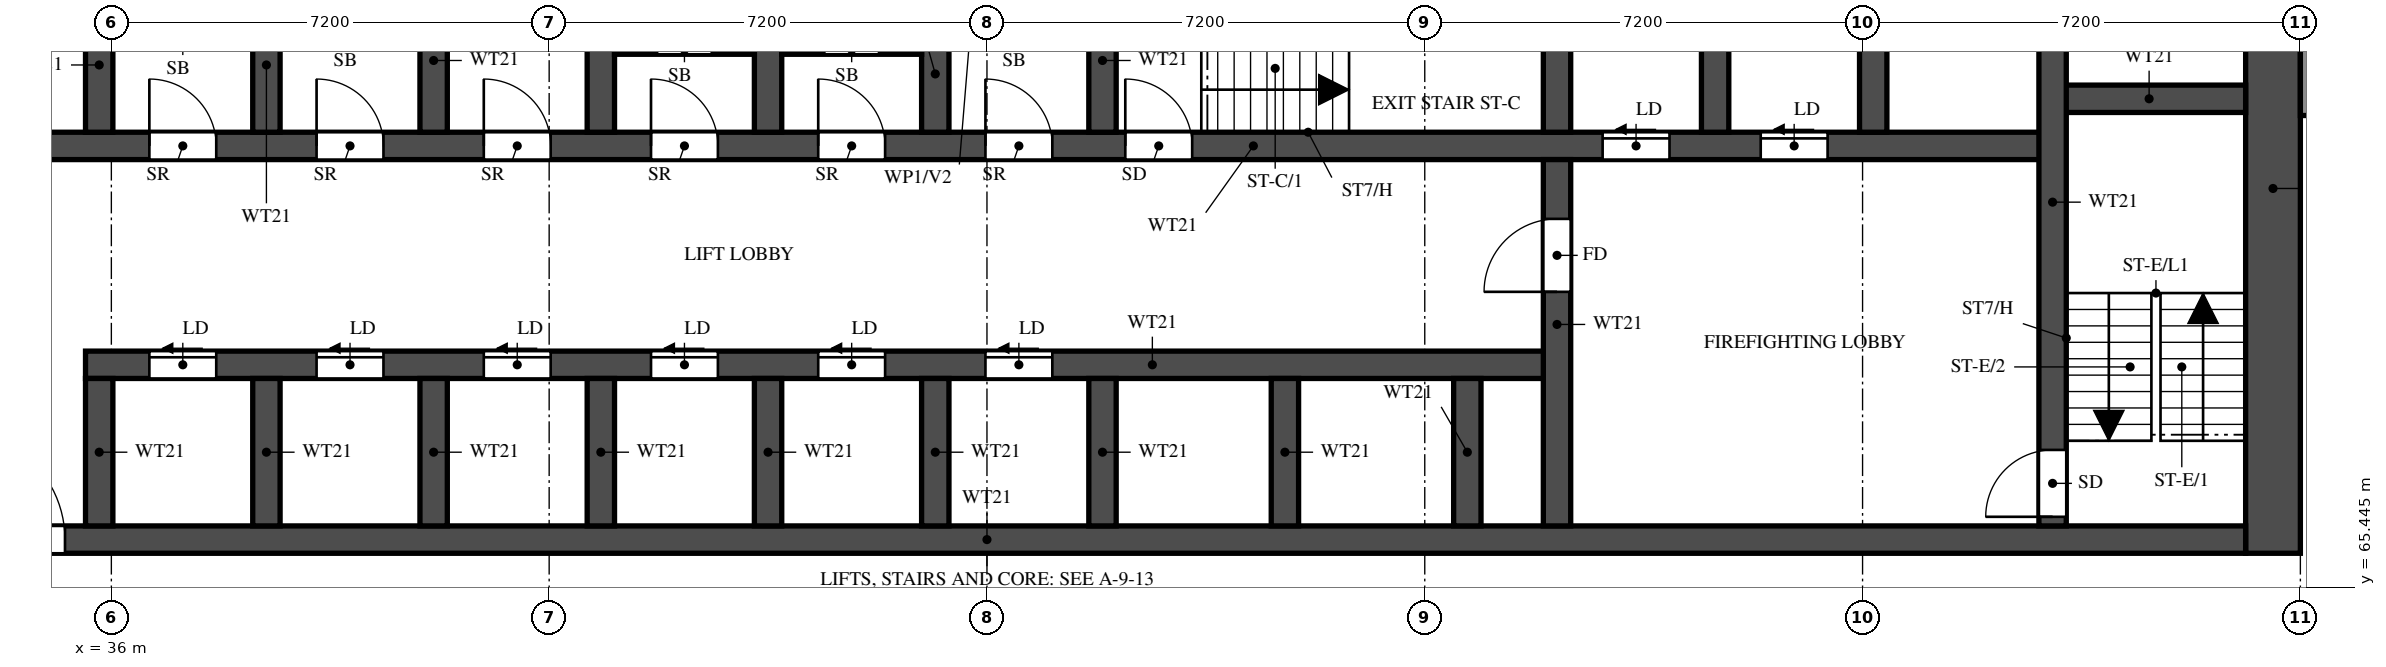
"""IFC4 building model, lengths in metres.
Left out: names, types, materials, properties, quantities, classifications, styles, units other than length and angle.
Written with IfcOpenShell. Run it as: python <this file> out.ifc"""

import sys

from ifc_helpers import new_model, si_unit, direction, frame, frame_2d, origin, place, context, subcontext, project, spatial, rectangle, extrude, element, fill, save


model = new_model("IFC4")
c1 = context("Model", 3, precision=1e-05, world=origin(), true_north=direction((0.0, 1.0)))
c2 = subcontext(c1, "Body", "Model", "MODEL_VIEW")
j1 = project(units=[si_unit("LENGTHUNIT", "METRE"), si_unit("PLANEANGLEUNIT", "RADIAN")], contexts=[c1])
p1 = place(None, origin())
s1 = spatial("IfcSite", under=j1, at=p1, CompositionType="ELEMENT")
p2 = place(p1, origin())
s2 = spatial("IfcBuilding", under=s1, at=p2, CompositionType="ELEMENT")
p3 = place(p2, frame((0.0, 0.0, 86.5)))
s3 = spatial("IfcBuildingStorey", under=s2, at=p3, CompositionType="ELEMENT", Elevation=86.5)
p4 = place(p3, frame((71.55, 66.0, 0.0), z_axis=(0.0, 0.0, 1.0), x_axis=(0.0, 1.0, 0.0)))
e1 = element("IfcWall", 1, at=p4, inside=s3, PredefinedType="SHEAR", context=c2, shape_type="SweptSolid", body=[
    extrude(rectangle(XDim=12.0, YDim=0.9, at=frame_2d((6.0, 0.0))), origin(), (0.0, 0.0, 1.0), 3.18),
])
p5 = place(p3, frame((29.7, 66.225, 0.0), z_axis=(0.0, 0.0, 1.0), x_axis=(1.0, 0.0, 0.0)))
e2 = element("IfcWall", 2, at=p5, inside=s3, PredefinedType="SHEAR", context=c2, shape_type="SweptSolid", body=[
    extrude(rectangle(XDim=41.4, YDim=0.45, at=frame_2d((20.7, 0.0))), origin(), (0.0, 0.0, 1.0), 3.18),
])
p6 = place(p5, frame((0.925, 0.0, 0.0)))
e3 = element("IfcOpeningElement", 3, at=p6, cuts=e2, PredefinedType="OPENING", context=c2, shape_type="SweptSolid", body=[
    extrude(rectangle(XDim=1.1, YDim=2.1, at=frame_2d((0.55, 1.05))), frame((0.0, 0.235, 0.0), z_axis=(0.0, -1.0, 0.0), x_axis=(1.0, 0.0, 0.0)), (0.0, 0.0, 1.0), 0.47),
])
p7 = place(p5, frame((3.738, 0.0, 0.0)))
e4 = element("IfcOpeningElement", 4, at=p7, cuts=e2, PredefinedType="OPENING", context=c2, shape_type="SweptSolid", body=[
    extrude(rectangle(XDim=1.8, YDim=2.1, at=frame_2d((0.9, 1.05))), frame((0.0, 0.235, 0.0), z_axis=(0.0, -1.0, 0.0), x_axis=(1.0, 0.0, 0.0)), (0.0, 0.0, 1.0), 0.47),
])
p8 = place(p3, frame((35.575, 69.1, 0.0), z_axis=(0.0, 0.0, 1.0), x_axis=(1.0, 0.0, 0.0)))
e5 = element("IfcWall", 5, at=p8, inside=s3, PredefinedType="SHEAR", context=c2, shape_type="SweptSolid", body=[
    extrude(rectangle(XDim=24.2, YDim=0.45, at=frame_2d((12.1, 0.0))), origin(), (0.0, 0.0, 1.0), 3.18),
])
p9 = place(p8, frame((1.05, 0.0, 0.0)))
e6 = element("IfcOpeningElement", 6, at=p9, cuts=e5, PredefinedType="OPENING", context=c2, shape_type="SweptSolid", body=[
    extrude(rectangle(XDim=1.1, YDim=2.1, at=frame_2d((0.55, 1.05))), frame((0.0, 0.235, 0.0), z_axis=(0.0, -1.0, 0.0), x_axis=(1.0, 0.0, 0.0)), (0.0, 0.0, 1.0), 0.47),
])
p10 = place(p8, frame((3.8, 0.0, 0.0)))
e7 = element("IfcOpeningElement", 7, at=p10, cuts=e5, PredefinedType="OPENING", context=c2, shape_type="SweptSolid", body=[
    extrude(rectangle(XDim=1.1, YDim=2.1, at=frame_2d((0.55, 1.05))), frame((0.0, 0.235, 0.0), z_axis=(0.0, -1.0, 0.0), x_axis=(1.0, 0.0, 0.0)), (0.0, 0.0, 1.0), 0.47),
])
p11 = place(p8, frame((6.55, 0.0, 0.0)))
e8 = element("IfcOpeningElement", 8, at=p11, cuts=e5, PredefinedType="OPENING", context=c2, shape_type="SweptSolid", body=[
    extrude(rectangle(XDim=1.1, YDim=2.1, at=frame_2d((0.55, 1.05))), frame((0.0, 0.235, 0.0), z_axis=(0.0, -1.0, 0.0), x_axis=(1.0, 0.0, 0.0)), (0.0, 0.0, 1.0), 0.47),
])
p12 = place(p8, frame((9.3, 0.0, 0.0)))
e9 = element("IfcOpeningElement", 9, at=p12, cuts=e5, PredefinedType="OPENING", context=c2, shape_type="SweptSolid", body=[
    extrude(rectangle(XDim=1.1, YDim=2.1, at=frame_2d((0.55, 1.05))), frame((0.0, 0.235, 0.0), z_axis=(0.0, -1.0, 0.0), x_axis=(1.0, 0.0, 0.0)), (0.0, 0.0, 1.0), 0.47),
])
p13 = place(p8, frame((12.05, 0.0, 0.0)))
e10 = element("IfcOpeningElement", 10, at=p13, cuts=e5, PredefinedType="OPENING", context=c2, shape_type="SweptSolid", body=[
    extrude(rectangle(XDim=1.1, YDim=2.1, at=frame_2d((0.55, 1.05))), frame((0.0, 0.235, 0.0), z_axis=(0.0, -1.0, 0.0), x_axis=(1.0, 0.0, 0.0)), (0.0, 0.0, 1.0), 0.47),
])
p14 = place(p8, frame((14.8, 0.0, 0.0)))
e11 = element("IfcOpeningElement", 11, at=p14, cuts=e5, PredefinedType="OPENING", context=c2, shape_type="SweptSolid", body=[
    extrude(rectangle(XDim=1.1, YDim=2.1, at=frame_2d((0.55, 1.05))), frame((0.0, 0.235, 0.0), z_axis=(0.0, -1.0, 0.0), x_axis=(1.0, 0.0, 0.0)), (0.0, 0.0, 1.0), 0.47),
])
p15 = place(p3, frame((32.875, 72.7, 0.0), z_axis=(0.0, 0.0, 1.0), x_axis=(1.0, 0.0, 0.0)))
e12 = element("IfcWall", 12, at=p15, inside=s3, PredefinedType="SHEAR", context=c2, shape_type="SweptSolid", body=[
    extrude(rectangle(XDim=35.05, YDim=0.45, at=frame_2d((17.525, 0.0))), origin(), (0.0, 0.0, 1.0), 3.18),
])
p16 = place(p15, frame((19.8, 0.0, 0.0)))
e13 = element("IfcOpeningElement", 13, at=p16, cuts=e12, PredefinedType="OPENING", context=c2, shape_type="SweptSolid", body=[
    extrude(rectangle(XDim=1.1, YDim=2.1, at=frame_2d((0.55, 1.05))), frame((0.0, 0.235, 0.0), z_axis=(0.0, -1.0, 0.0), x_axis=(1.0, 0.0, 0.0)), (0.0, 0.0, 1.0), 0.47),
])
p17 = place(p15, frame((27.65, 0.0, 0.0)))
e14 = element("IfcOpeningElement", 14, at=p17, cuts=e12, PredefinedType="OPENING", context=c2, shape_type="SweptSolid", body=[
    extrude(rectangle(XDim=1.1, YDim=2.1, at=frame_2d((0.55, 1.05))), frame((0.0, 0.235, 0.0), z_axis=(0.0, -1.0, 0.0), x_axis=(1.0, 0.0, 0.0)), (0.0, 0.0, 1.0), 0.47),
])
p18 = place(p15, frame((30.25, 0.0, 0.0)))
e15 = element("IfcOpeningElement", 15, at=p18, cuts=e12, PredefinedType="OPENING", context=c2, shape_type="SweptSolid", body=[
    extrude(rectangle(XDim=1.1, YDim=2.1, at=frame_2d((0.55, 1.05))), frame((0.0, 0.235, 0.0), z_axis=(0.0, -1.0, 0.0), x_axis=(1.0, 0.0, 0.0)), (0.0, 0.0, 1.0), 0.47),
])
p19 = place(p15, frame((3.75, 0.0, 0.0)))
e16 = element("IfcOpeningElement", 16, at=p19, cuts=e12, PredefinedType="OPENING", context=c2, shape_type="SweptSolid", body=[
    extrude(rectangle(XDim=1.1, YDim=2.1, at=frame_2d((0.55, 1.05))), frame((0.0, 0.235, 0.0), z_axis=(0.0, -1.0, 0.0), x_axis=(1.0, 0.0, 0.0)), (0.0, 0.0, 1.0), 0.47),
])
p20 = place(p15, frame((6.5, 0.0, 0.0)))
e17 = element("IfcOpeningElement", 17, at=p20, cuts=e12, PredefinedType="OPENING", context=c2, shape_type="SweptSolid", body=[
    extrude(rectangle(XDim=1.1, YDim=2.1, at=frame_2d((0.55, 1.05))), frame((0.0, 0.235, 0.0), z_axis=(0.0, -1.0, 0.0), x_axis=(1.0, 0.0, 0.0)), (0.0, 0.0, 1.0), 0.47),
])
p21 = place(p15, frame((9.25, 0.0, 0.0)))
e18 = element("IfcOpeningElement", 18, at=p21, cuts=e12, PredefinedType="OPENING", context=c2, shape_type="SweptSolid", body=[
    extrude(rectangle(XDim=1.1, YDim=2.1, at=frame_2d((0.55, 1.05))), frame((0.0, 0.235, 0.0), z_axis=(0.0, -1.0, 0.0), x_axis=(1.0, 0.0, 0.0)), (0.0, 0.0, 1.0), 0.47),
])
p22 = place(p15, frame((12.0, 0.0, 0.0)))
e19 = element("IfcOpeningElement", 19, at=p22, cuts=e12, PredefinedType="OPENING", context=c2, shape_type="SweptSolid", body=[
    extrude(rectangle(XDim=1.1, YDim=2.1, at=frame_2d((0.55, 1.05))), frame((0.0, 0.235, 0.0), z_axis=(0.0, -1.0, 0.0), x_axis=(1.0, 0.0, 0.0)), (0.0, 0.0, 1.0), 0.47),
])
p23 = place(p15, frame((14.75, 0.0, 0.0)))
e20 = element("IfcOpeningElement", 20, at=p23, cuts=e12, PredefinedType="OPENING", context=c2, shape_type="SweptSolid", body=[
    extrude(rectangle(XDim=1.1, YDim=2.1, at=frame_2d((0.55, 1.05))), frame((0.0, 0.235, 0.0), z_axis=(0.0, -1.0, 0.0), x_axis=(1.0, 0.0, 0.0)), (0.0, 0.0, 1.0), 0.47),
])
p24 = place(p15, frame((17.5, 0.0, 0.0)))
e21 = element("IfcOpeningElement", 21, at=p24, cuts=e12, PredefinedType="OPENING", context=c2, shape_type="SweptSolid", body=[
    extrude(rectangle(XDim=1.1, YDim=2.1, at=frame_2d((0.55, 1.05))), frame((0.0, 0.235, 0.0), z_axis=(0.0, -1.0, 0.0), x_axis=(1.0, 0.0, 0.0)), (0.0, 0.0, 1.0), 0.47),
])
p25 = place(p15, frame((0.913, 0.0, 0.0)))
e22 = element("IfcOpeningElement", 22, at=p25, cuts=e12, PredefinedType="OPENING", context=c2, shape_type="SweptSolid", body=[
    extrude(rectangle(XDim=1.1, YDim=2.1, at=frame_2d((0.55, 1.05))), frame((0.0, 0.235, 0.0), z_axis=(0.0, -1.0, 0.0), x_axis=(1.0, 0.0, 0.0)), (0.0, 0.0, 1.0), 0.47),
])
p26 = place(p3, frame((67.925, 73.475, 0.0), z_axis=(0.0, 0.0, 1.0), x_axis=(1.0, 0.0, 0.0)))
e23 = element("IfcWall", 23, at=p26, inside=s3, PredefinedType="SHEAR", context=c2, shape_type="SweptSolid", body=[
    extrude(rectangle(XDim=3.175, YDim=0.45, at=frame_2d((1.587, 0.0))), origin(), (0.0, 0.0, 1.0), 3.18),
])
p27 = place(p3, frame((67.925, 66.45, 0.0), z_axis=(0.0, 0.0, 1.0), x_axis=(0.0, 1.0, 0.0)))
e24 = element("IfcWall", 24, at=p27, inside=s3, PredefinedType="SHEAR", context=c2, shape_type="SweptSolid", body=[
    extrude(rectangle(XDim=10.65, YDim=0.45, at=frame_2d((5.325, 0.0))), origin(), (0.0, 0.0, 1.0), 3.18),
])
p28 = place(p27, frame((0.15, 0.0, 0.0)))
e25 = element("IfcOpeningElement", 25, at=p28, cuts=e24, PredefinedType="OPENING", context=c2, shape_type="SweptSolid", body=[
    extrude(rectangle(XDim=1.1, YDim=2.1, at=frame_2d((0.55, 1.05))), frame((0.0, 0.235, 0.0), z_axis=(0.0, -1.0, 0.0), x_axis=(1.0, 0.0, 0.0)), (0.0, 0.0, 1.0), 0.47),
])
p29 = place(p3, frame((59.775, 66.45, 0.0), z_axis=(0.0, 0.0, 1.0), x_axis=(0.0, 1.0, 0.0)))
e26 = element("IfcWall", 26, at=p29, inside=s3, PredefinedType="SHEAR", context=c2, shape_type="SweptSolid", body=[
    extrude(rectangle(XDim=6.025, YDim=0.45, at=frame_2d((3.013, 0.0))), origin(), (0.0, 0.0, 1.0), 3.18),
])
p30 = place(p29, frame((3.85, 0.0, 0.0)))
e27 = element("IfcOpeningElement", 27, at=p30, cuts=e26, PredefinedType="OPENING", context=c2, shape_type="SweptSolid", body=[
    extrude(rectangle(XDim=1.2, YDim=2.1, at=frame_2d((0.6, 1.05))), frame((0.0, 0.235, 0.0), z_axis=(0.0, -1.0, 0.0), x_axis=(1.0, 0.0, 0.0)), (0.0, 0.0, 1.0), 0.47),
])
p31 = place(p3, frame((59.775, 72.925, 0.0), z_axis=(0.0, 0.0, 1.0), x_axis=(0.0, 1.0, 0.0)))
e28 = element("IfcWall", 28, at=p31, inside=s3, PredefinedType="SHEAR", context=c2, shape_type="SweptSolid", body=[
    extrude(rectangle(XDim=2.95, YDim=0.45, at=frame_2d((1.475, 0.0))), origin(), (0.0, 0.0, 1.0), 3.18),
])
for number, where, z_axis, x_axis in (
    (29, (35.8, 66.45, 0.0), (0.0, 0.0, 1.0), (0.0, 1.0, 0.0)),
    (30, (38.55, 66.45, 0.0), (0.0, 0.0, 1.0), (0.0, 1.0, 0.0)),
    (31, (41.3, 66.45, 0.0), (0.0, 0.0, 1.0), (0.0, 1.0, 0.0)),
    (32, (44.05, 66.45, 0.0), (0.0, 0.0, 1.0), (0.0, 1.0, 0.0)),
    (33, (46.8, 66.45, 0.0), (0.0, 0.0, 1.0), (0.0, 1.0, 0.0)),
    (34, (49.55, 66.45, 0.0), (0.0, 0.0, 1.0), (0.0, 1.0, 0.0)),
    (35, (52.3, 66.45, 0.0), (0.0, 0.0, 1.0), (0.0, 1.0, 0.0)),
    (36, (55.3, 66.45, 0.0), (0.0, 0.0, 1.0), (0.0, 1.0, 0.0)),
    (37, (58.3, 66.45, 0.0), (0.0, 0.0, 1.0), (0.0, 1.0, 0.0)),
):
    element("IfcWall", number, at=place(p3, frame(where, z_axis=z_axis, x_axis=x_axis)), inside=s3, PredefinedType="SHEAR", context=c2, shape_type="SweptSolid", body=[
        extrude(rectangle(XDim=2.425, YDim=0.45, at=frame_2d((1.212, 0.0))), origin(), (0.0, 0.0, 1.0), 3.18),
    ])
for number, where, z_axis, x_axis in (
    (38, (35.8, 72.925, 0.0), (0.0, 0.0, 1.0), (0.0, 1.0, 0.0)),
    (39, (38.55, 72.925, 0.0), (0.0, 0.0, 1.0), (0.0, 1.0, 0.0)),
    (40, (41.3, 72.925, 0.0), (0.0, 0.0, 1.0), (0.0, 1.0, 0.0)),
    (41, (44.05, 72.925, 0.0), (0.0, 0.0, 1.0), (0.0, 1.0, 0.0)),
    (42, (46.8, 72.925, 0.0), (0.0, 0.0, 1.0), (0.0, 1.0, 0.0)),
    (43, (49.55, 72.925, 0.0), (0.0, 0.0, 1.0), (0.0, 1.0, 0.0)),
    (44, (52.3, 72.925, 0.0), (0.0, 0.0, 1.0), (0.0, 1.0, 0.0)),
    (45, (62.375, 72.925, 0.0), (0.0, 0.0, 1.0), (0.0, 1.0, 0.0)),
    (46, (64.975, 72.925, 0.0), (0.0, 0.0, 1.0), (0.0, 1.0, 0.0)),
):
    element("IfcWall", number, at=place(p3, frame(where, z_axis=z_axis, x_axis=x_axis)), inside=s3, PredefinedType="SHEAR", context=c2, shape_type="SweptSolid", body=[
        extrude(rectangle(XDim=2.95, YDim=0.45, at=frame_2d((1.475, 0.0))), origin(), (0.0, 0.0, 1.0), 3.18),
    ])
p32 = place(p3, frame((44.275, 74.282, 0.0), z_axis=(0.0, 0.0, 1.0), x_axis=(1.0, 0.0, 0.0)))
e47 = element("IfcWall", 47, at=p32, inside=s3, PredefinedType="PARTITIONING", context=c2, shape_type="SweptSolid", body=[
    extrude(rectangle(XDim=2.3, YDim=0.15, at=frame_2d((1.15, 0.0))), origin(), (0.0, 0.0, 1.0), 3.18),
])
p33 = place(p32, frame((0.7, 0.0, 0.0)))
e48 = element("IfcOpeningElement", 48, at=p33, cuts=e47, PredefinedType="OPENING", context=c2, shape_type="SweptSolid", body=[
    extrude(rectangle(XDim=0.9, YDim=2.1, at=frame_2d((0.45, 1.05))), frame((0.0, 0.085, 0.0), z_axis=(0.0, -1.0, 0.0), x_axis=(1.0, 0.0, 0.0)), (0.0, 0.0, 1.0), 0.17),
])
p34 = place(p3, frame((47.025, 74.282, 0.0), z_axis=(0.0, 0.0, 1.0), x_axis=(1.0, 0.0, 0.0)))
e49 = element("IfcWall", 49, at=p34, inside=s3, PredefinedType="PARTITIONING", context=c2, shape_type="SweptSolid", body=[
    extrude(rectangle(XDim=2.3, YDim=0.15, at=frame_2d((1.15, 0.0))), origin(), (0.0, 0.0, 1.0), 3.18),
])
p35 = place(p34, frame((0.7, 0.0, 0.0)))
e50 = element("IfcOpeningElement", 50, at=p35, cuts=e49, PredefinedType="OPENING", context=c2, shape_type="SweptSolid", body=[
    extrude(rectangle(XDim=0.9, YDim=2.1, at=frame_2d((0.45, 1.05))), frame((0.0, 0.085, 0.0), z_axis=(0.0, -1.0, 0.0), x_axis=(1.0, 0.0, 0.0)), (0.0, 0.0, 1.0), 0.17),
])
p36 = place(p3, frame((72.1, 73.2, 0.0), z_axis=(0.0, 0.0, 1.0), x_axis=(0.0, 1.0, 0.0)))
e51 = element("IfcWall", 51, at=p36, inside=s3, PredefinedType="SOLIDWALL", context=c2, shape_type="SweptSolid", body=[
    extrude(rectangle(XDim=4.8, YDim=0.2, at=frame_2d((2.4, 0.0))), origin(), (0.0, 0.0, 1.0), 3.18),
])
p37 = place(p16, origin())
e52 = element("IfcDoor", 52, at=p37, inside=s3, OperationType="SINGLE_SWING_LEFT", PredefinedType="DOOR", context=c2, shape_type="SweptSolid", body=[
    extrude(rectangle(XDim=1.1, YDim=2.1, at=frame_2d((0.55, 1.05))), frame((0.0, 0.025, 0.0), z_axis=(0.0, -1.0, 0.0), x_axis=(1.0, 0.0, 0.0)), (0.0, 0.0, 1.0), 0.05),
])
fill(e13, e52)
p38 = place(p28, origin())
e53 = element("IfcDoor", 53, at=p38, inside=s3, OperationType="SINGLE_SWING_LEFT", PredefinedType="DOOR", context=c2, shape_type="SweptSolid", body=[
    extrude(rectangle(XDim=1.1, YDim=2.1, at=frame_2d((0.55, 1.05))), frame((0.0, 0.025, 0.0), z_axis=(0.0, -1.0, 0.0), x_axis=(1.0, 0.0, 0.0)), (0.0, 0.0, 1.0), 0.05),
])
fill(e25, e53)
p39 = place(p7, origin())
e54 = element("IfcDoor", 54, at=p39, inside=s3, OperationType="DOUBLE_DOOR_SINGLE_SWING", PredefinedType="DOOR", context=c2, shape_type="SweptSolid", body=[
    extrude(rectangle(XDim=1.8, YDim=2.1, at=frame_2d((0.9, 1.05))), frame((0.0, 0.025, 0.0), z_axis=(0.0, -1.0, 0.0), x_axis=(1.0, 0.0, 0.0)), (0.0, 0.0, 1.0), 0.05),
])
fill(e4, e54)
p40 = place(p30, origin())
e55 = element("IfcDoor", 55, at=p40, inside=s3, OperationType="SINGLE_SWING_RIGHT", PredefinedType="DOOR", context=c2, shape_type="SweptSolid", body=[
    extrude(rectangle(XDim=1.2, YDim=2.1, at=frame_2d((0.6, 1.05))), frame((0.0, 0.025, 0.0), z_axis=(0.0, -1.0, 0.0), x_axis=(1.0, 0.0, 0.0)), (0.0, 0.0, 1.0), 0.05),
])
fill(e27, e55)
p41 = place(p17, origin())
e56 = element("IfcDoor", 56, at=p41, inside=s3, OperationType="SLIDING_TO_LEFT", PredefinedType="DOOR", context=c2, shape_type="SweptSolid", body=[
    extrude(rectangle(XDim=1.1, YDim=2.1, at=frame_2d((0.55, 1.05))), frame((0.0, 0.025, 0.0), z_axis=(0.0, -1.0, 0.0), x_axis=(1.0, 0.0, 0.0)), (0.0, 0.0, 1.0), 0.05),
])
fill(e14, e56)
p42 = place(p18, origin())
e57 = element("IfcDoor", 57, at=p42, inside=s3, OperationType="SLIDING_TO_LEFT", PredefinedType="DOOR", context=c2, shape_type="SweptSolid", body=[
    extrude(rectangle(XDim=1.1, YDim=2.1, at=frame_2d((0.55, 1.05))), frame((0.0, 0.025, 0.0), z_axis=(0.0, -1.0, 0.0), x_axis=(1.0, 0.0, 0.0)), (0.0, 0.0, 1.0), 0.05),
])
fill(e15, e57)
p43 = place(p9, origin())
e58 = element("IfcDoor", 58, at=p43, inside=s3, OperationType="SLIDING_TO_LEFT", PredefinedType="DOOR", context=c2, shape_type="SweptSolid", body=[
    extrude(rectangle(XDim=1.1, YDim=2.1, at=frame_2d((0.55, 1.05))), frame((0.0, 0.025, 0.0), z_axis=(0.0, -1.0, 0.0), x_axis=(1.0, 0.0, 0.0)), (0.0, 0.0, 1.0), 0.05),
])
fill(e6, e58)
p44 = place(p10, origin())
e59 = element("IfcDoor", 59, at=p44, inside=s3, OperationType="SLIDING_TO_LEFT", PredefinedType="DOOR", context=c2, shape_type="SweptSolid", body=[
    extrude(rectangle(XDim=1.1, YDim=2.1, at=frame_2d((0.55, 1.05))), frame((0.0, 0.025, 0.0), z_axis=(0.0, -1.0, 0.0), x_axis=(1.0, 0.0, 0.0)), (0.0, 0.0, 1.0), 0.05),
])
fill(e7, e59)
p45 = place(p11, origin())
e60 = element("IfcDoor", 60, at=p45, inside=s3, OperationType="SLIDING_TO_LEFT", PredefinedType="DOOR", context=c2, shape_type="SweptSolid", body=[
    extrude(rectangle(XDim=1.1, YDim=2.1, at=frame_2d((0.55, 1.05))), frame((0.0, 0.025, 0.0), z_axis=(0.0, -1.0, 0.0), x_axis=(1.0, 0.0, 0.0)), (0.0, 0.0, 1.0), 0.05),
])
fill(e8, e60)
p46 = place(p12, origin())
e61 = element("IfcDoor", 61, at=p46, inside=s3, OperationType="SLIDING_TO_LEFT", PredefinedType="DOOR", context=c2, shape_type="SweptSolid", body=[
    extrude(rectangle(XDim=1.1, YDim=2.1, at=frame_2d((0.55, 1.05))), frame((0.0, 0.025, 0.0), z_axis=(0.0, -1.0, 0.0), x_axis=(1.0, 0.0, 0.0)), (0.0, 0.0, 1.0), 0.05),
])
fill(e9, e61)
p47 = place(p13, origin())
e62 = element("IfcDoor", 62, at=p47, inside=s3, OperationType="SLIDING_TO_LEFT", PredefinedType="DOOR", context=c2, shape_type="SweptSolid", body=[
    extrude(rectangle(XDim=1.1, YDim=2.1, at=frame_2d((0.55, 1.05))), frame((0.0, 0.025, 0.0), z_axis=(0.0, -1.0, 0.0), x_axis=(1.0, 0.0, 0.0)), (0.0, 0.0, 1.0), 0.05),
])
fill(e10, e62)
p48 = place(p14, origin())
e63 = element("IfcDoor", 63, at=p48, inside=s3, OperationType="SLIDING_TO_LEFT", PredefinedType="DOOR", context=c2, shape_type="SweptSolid", body=[
    extrude(rectangle(XDim=1.1, YDim=2.1, at=frame_2d((0.55, 1.05))), frame((0.0, 0.025, 0.0), z_axis=(0.0, -1.0, 0.0), x_axis=(1.0, 0.0, 0.0)), (0.0, 0.0, 1.0), 0.05),
])
fill(e11, e63)
p49 = place(p19, origin())
e64 = element("IfcDoor", 64, at=p49, inside=s3, OperationType="SINGLE_SWING_LEFT", PredefinedType="DOOR", context=c2, shape_type="SweptSolid", body=[
    extrude(rectangle(XDim=1.1, YDim=2.1, at=frame_2d((0.55, 1.05))), frame((0.0, 0.025, 0.0), z_axis=(0.0, -1.0, 0.0), x_axis=(1.0, 0.0, 0.0)), (0.0, 0.0, 1.0), 0.05),
])
fill(e16, e64)
p50 = place(p20, origin())
e65 = element("IfcDoor", 65, at=p50, inside=s3, OperationType="SINGLE_SWING_LEFT", PredefinedType="DOOR", context=c2, shape_type="SweptSolid", body=[
    extrude(rectangle(XDim=1.1, YDim=2.1, at=frame_2d((0.55, 1.05))), frame((0.0, 0.025, 0.0), z_axis=(0.0, -1.0, 0.0), x_axis=(1.0, 0.0, 0.0)), (0.0, 0.0, 1.0), 0.05),
])
fill(e17, e65)
p51 = place(p21, origin())
e66 = element("IfcDoor", 66, at=p51, inside=s3, OperationType="SINGLE_SWING_LEFT", PredefinedType="DOOR", context=c2, shape_type="SweptSolid", body=[
    extrude(rectangle(XDim=1.1, YDim=2.1, at=frame_2d((0.55, 1.05))), frame((0.0, 0.025, 0.0), z_axis=(0.0, -1.0, 0.0), x_axis=(1.0, 0.0, 0.0)), (0.0, 0.0, 1.0), 0.05),
])
fill(e18, e66)
p52 = place(p22, origin())
e67 = element("IfcDoor", 67, at=p52, inside=s3, OperationType="SINGLE_SWING_LEFT", PredefinedType="DOOR", context=c2, shape_type="SweptSolid", body=[
    extrude(rectangle(XDim=1.1, YDim=2.1, at=frame_2d((0.55, 1.05))), frame((0.0, 0.025, 0.0), z_axis=(0.0, -1.0, 0.0), x_axis=(1.0, 0.0, 0.0)), (0.0, 0.0, 1.0), 0.05),
])
fill(e19, e67)
p53 = place(p23, origin())
e68 = element("IfcDoor", 68, at=p53, inside=s3, OperationType="SINGLE_SWING_LEFT", PredefinedType="DOOR", context=c2, shape_type="SweptSolid", body=[
    extrude(rectangle(XDim=1.1, YDim=2.1, at=frame_2d((0.55, 1.05))), frame((0.0, 0.025, 0.0), z_axis=(0.0, -1.0, 0.0), x_axis=(1.0, 0.0, 0.0)), (0.0, 0.0, 1.0), 0.05),
])
fill(e20, e68)
p54 = place(p24, origin())
e69 = element("IfcDoor", 69, at=p54, inside=s3, OperationType="SINGLE_SWING_LEFT", PredefinedType="DOOR", context=c2, shape_type="SweptSolid", body=[
    extrude(rectangle(XDim=1.1, YDim=2.1, at=frame_2d((0.55, 1.05))), frame((0.0, 0.025, 0.0), z_axis=(0.0, -1.0, 0.0), x_axis=(1.0, 0.0, 0.0)), (0.0, 0.0, 1.0), 0.05),
])
fill(e21, e69)
save(model, sys.argv[1])
